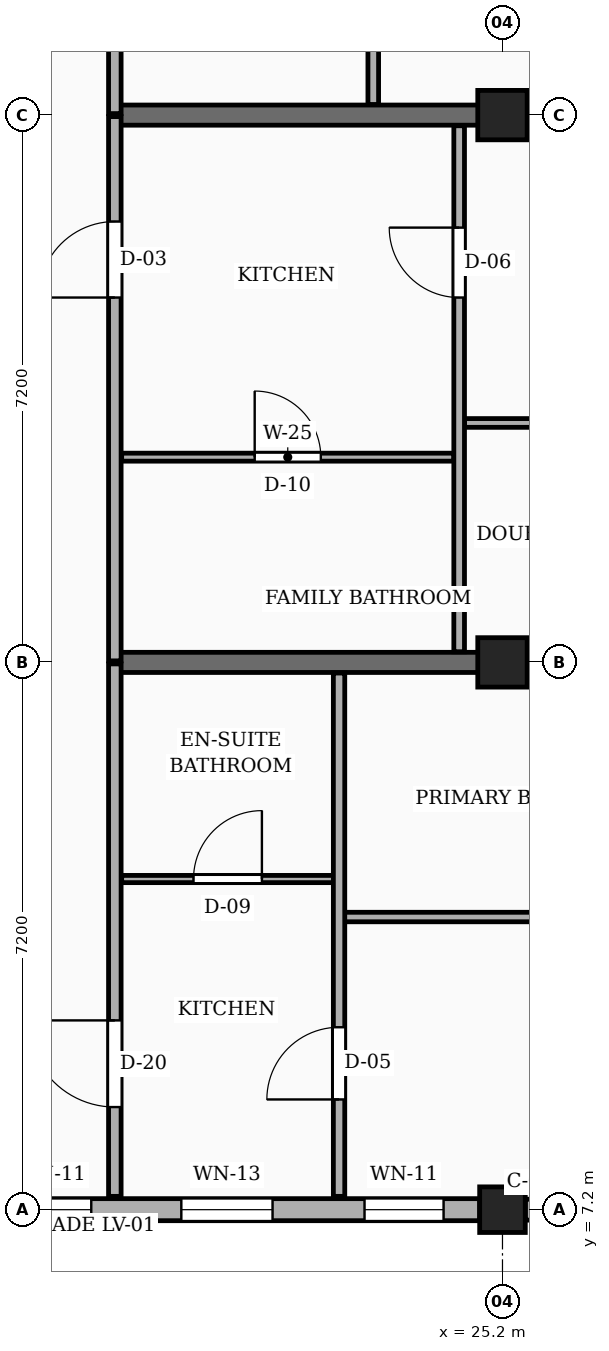
"""IFC4 building model, lengths in metres.
Left out: names, types, materials, properties, quantities, classifications, styles, units other than length and angle.
Written with IfcOpenShell. Run it as: python <this file> out.ifc"""

import sys

from ifc_helpers import new_model, si_unit, direction, frame, frame_2d, origin, origin_2d, place, context, subcontext, project, spatial, rectangle, extrude, element, fill, save


model = new_model("IFC4")
c1 = context("Model", 3, precision=1e-05, world=origin(), true_north=direction((0.0, 1.0)))
c2 = subcontext(c1, "Body", "Model", "MODEL_VIEW")
j1 = project(units=[si_unit("LENGTHUNIT", "METRE"), si_unit("PLANEANGLEUNIT", "RADIAN")], contexts=[c1])
p1 = place(None, origin())
s1 = spatial("IfcSite", under=j1, at=p1, CompositionType="ELEMENT")
p2 = place(p1, origin())
s2 = spatial("IfcBuilding", under=s1, at=p2, CompositionType="ELEMENT")
p3 = place(p2, frame((0.0, 0.0, 4.5)))
s3 = spatial("IfcBuildingStorey", under=s2, at=p3, CompositionType="ELEMENT", Elevation=4.5)
p4 = place(p3, frame((25.2, 7.2, 0.0), z_axis=(0.0, 0.0, 1.0), x_axis=(1.0, 0.0, 0.0)))
e1 = element("IfcColumn", 1, at=p4, inside=s3, PredefinedType="COLUMN", context=c2, shape_type="SweptSolid", body=[
    extrude(rectangle(XDim=0.6, YDim=0.6, at=origin_2d()), origin(), (0.0, 0.0, 1.0), 3.15),
])
for number, where, z_axis, x_axis in (
    (2, (25.2, 14.4, 0.0), (0.0, 0.0, 1.0), (1.0, 0.0, 0.0)),
    (3, (25.2, 21.6, 0.0), (0.0, 0.0, 1.0), (1.0, 0.0, 0.0)),
):
    element("IfcColumn", number, at=place(p3, frame(where, z_axis=z_axis, x_axis=x_axis)), inside=s3, PredefinedType="COLUMN", context=c2, shape_type="SweptSolid", body=[
        extrude(rectangle(XDim=0.65, YDim=0.65, at=origin_2d()), origin(), (0.0, 0.0, 1.0), 3.15),
    ])
for number, where, z_axis, x_axis in (
    (4, (20.1, 14.4, 0.0), (0.0, 0.0, 1.0), (1.0, 0.0, 0.0)),
    (5, (20.1, 21.6, 0.0), (0.0, 0.0, 1.0), (1.0, 0.0, 0.0)),
):
    element("IfcWall", number, at=place(p3, frame(where, z_axis=z_axis, x_axis=x_axis)), inside=s3, PredefinedType="SOLIDWALL", context=c2, shape_type="SweptSolid", body=[
        extrude(rectangle(XDim=12.0, YDim=0.265, at=frame_2d((6.0, 0.0))), origin(), (0.0, 0.0, 1.0), 2.17),
    ])
p5 = place(p3, frame((18.3, 7.2, 0.0), z_axis=(0.0, 0.0, 1.0), x_axis=(1.0, 0.0, 0.0)))
e6 = element("IfcWall", 6, at=p5, inside=s3, PredefinedType="SOLIDWALL", context=c2, shape_type="SweptSolid", body=[
    extrude(rectangle(XDim=6.6, YDim=0.29, at=frame_2d((3.3, 0.0))), origin(), (0.0, 0.0, 1.0), 2.44),
])
p6 = place(p5, frame((0.45, 0.0, 0.78)))
e7 = element("IfcOpeningElement", 7, at=p6, cuts=e6, PredefinedType="OPENING", context=c2, shape_type="SweptSolid", body=[
    extrude(rectangle(XDim=1.04, YDim=1.26, at=frame_2d((0.52, 0.63))), frame((0.0, 0.155, 0.0), z_axis=(0.0, -1.0, 0.0), x_axis=(1.0, 0.0, 0.0)), (0.0, 0.0, 1.0), 0.31),
])
p7 = place(p5, frame((2.675, 0.0, 0.78)))
e8 = element("IfcOpeningElement", 8, at=p7, cuts=e6, PredefinedType="OPENING", context=c2, shape_type="SweptSolid", body=[
    extrude(rectangle(XDim=1.2, YDim=1.26, at=frame_2d((0.6, 0.63))), frame((0.0, 0.155, 0.0), z_axis=(0.0, -1.0, 0.0), x_axis=(1.0, 0.0, 0.0)), (0.0, 0.0, 1.0), 0.31),
])
p8 = place(p5, frame((5.085, 0.0, 0.78)))
e9 = element("IfcOpeningElement", 9, at=p8, cuts=e6, PredefinedType="OPENING", context=c2, shape_type="SweptSolid", body=[
    extrude(rectangle(XDim=1.04, YDim=1.26, at=frame_2d((0.52, 0.63))), frame((0.0, 0.155, 0.0), z_axis=(0.0, -1.0, 0.0), x_axis=(1.0, 0.0, 0.0)), (0.0, 0.0, 1.0), 0.31),
])
p9 = place(p3, frame((25.5, 7.2, 0.0), z_axis=(0.0, 0.0, 1.0), x_axis=(1.0, 0.0, 0.0)))
e10 = element("IfcWall", 10, at=p9, inside=s3, PredefinedType="SOLIDWALL", context=c2, shape_type="SweptSolid", body=[
    extrude(rectangle(XDim=6.6, YDim=0.275, at=frame_2d((3.3, 0.0))), origin(), (0.0, 0.0, 1.0), 2.44),
])
p10 = place(p9, frame((0.45, 0.0, 0.78)))
e11 = element("IfcOpeningElement", 11, at=p10, cuts=e10, PredefinedType="OPENING", context=c2, shape_type="SweptSolid", body=[
    extrude(rectangle(XDim=1.28, YDim=1.26, at=frame_2d((0.64, 0.63))), frame((0.0, 0.147, 0.0), z_axis=(0.0, -1.0, 0.0), x_axis=(1.0, 0.0, 0.0)), (0.0, 0.0, 1.0), 0.295),
])
p11 = place(p9, frame((4.65, 0.0, 0.78)))
e12 = element("IfcOpeningElement", 12, at=p11, cuts=e10, PredefinedType="OPENING", context=c2, shape_type="SweptSolid", body=[
    extrude(rectangle(XDim=1.44, YDim=1.26, at=frame_2d((0.72, 0.63))), frame((0.0, 0.147, 0.0), z_axis=(0.0, -1.0, 0.0), x_axis=(1.0, 0.0, 0.0)), (0.0, 0.0, 1.0), 0.295),
])
p12 = place(p3, frame((20.1, 7.375, 0.0), z_axis=(0.0, 0.0, 1.0), x_axis=(0.0, 1.0, 0.0)))
e13 = element("IfcWall", 13, at=p12, inside=s3, PredefinedType="PARTITIONING", context=c2, shape_type="SweptSolid", body=[
    extrude(rectangle(XDim=7.005, YDim=0.165, at=frame_2d((3.502, 0.0))), origin(), (0.0, 0.0, 1.0), 2.305),
])
p13 = place(p12, frame((1.175, 0.0, 0.0)))
e14 = element("IfcOpeningElement", 14, at=p13, cuts=e13, PredefinedType="OPENING", context=c2, shape_type="SweptSolid", body=[
    extrude(rectangle(XDim=1.14, YDim=2.18, at=frame_2d((0.57, 1.09))), frame((0.0, 0.093, 0.0), z_axis=(0.0, -1.0, 0.0), x_axis=(1.0, 0.0, 0.0)), (0.0, 0.0, 1.0), 0.185),
])
p14 = place(p3, frame((20.1, 14.42, 0.0), z_axis=(0.0, 0.0, 1.0), x_axis=(0.0, 1.0, 0.0)))
e15 = element("IfcWall", 15, at=p14, inside=s3, PredefinedType="PARTITIONING", context=c2, shape_type="SweptSolid", body=[
    extrude(rectangle(XDim=7.16, YDim=0.165, at=frame_2d((3.58, 0.0))), origin(), (0.0, 0.0, 1.0), 2.305),
])
p15 = place(p14, frame((4.78, 0.0, 0.0)))
e16 = element("IfcOpeningElement", 16, at=p15, cuts=e15, PredefinedType="OPENING", context=c2, shape_type="SweptSolid", body=[
    extrude(rectangle(XDim=1.0, YDim=2.15, at=frame_2d((0.5, 1.075))), frame((0.0, 0.093, 0.0), z_axis=(0.0, -1.0, 0.0), x_axis=(1.0, 0.0, 0.0)), (0.0, 0.0, 1.0), 0.185),
])
p16 = place(p3, frame((20.1, 21.62, 0.0), z_axis=(0.0, 0.0, 1.0), x_axis=(0.0, 1.0, 0.0)))
e17 = element("IfcWall", 17, at=p16, inside=s3, PredefinedType="PARTITIONING", context=c2, shape_type="SweptSolid", body=[
    extrude(rectangle(XDim=7.16, YDim=0.165, at=frame_2d((3.58, 0.0))), origin(), (0.0, 0.0, 1.0), 2.305),
])
p17 = place(p16, frame((1.33, 0.0, 0.0)))
e18 = element("IfcOpeningElement", 18, at=p17, cuts=e17, PredefinedType="OPENING", context=c2, shape_type="SweptSolid", body=[
    extrude(rectangle(XDim=0.94, YDim=2.12, at=frame_2d((0.47, 1.06))), frame((0.0, 0.093, 0.0), z_axis=(0.0, -1.0, 0.0), x_axis=(1.0, 0.0, 0.0)), (0.0, 0.0, 1.0), 0.185),
])
p18 = place(p3, frame((23.12, 11.05, 0.0), z_axis=(0.0, 0.0, 1.0), x_axis=(1.0, 0.0, 0.0)))
e19 = element("IfcWall", 19, at=p18, inside=s3, PredefinedType="PARTITIONING", context=c2, shape_type="SweptSolid", body=[
    extrude(rectangle(XDim=9.105, YDim=0.125, at=frame_2d((4.552, 0.0))), origin(), (0.0, 0.0, 1.0), 2.305),
])
p19 = place(p18, frame((4.103, 0.0, 0.0)))
e20 = element("IfcOpeningElement", 20, at=p19, cuts=e19, PredefinedType="OPENING", context=c2, shape_type="SweptSolid", body=[
    extrude(rectangle(XDim=0.9, YDim=2.1, at=frame_2d((0.45, 1.05))), frame((0.0, 0.073, 0.0), z_axis=(0.0, -1.0, 0.0), x_axis=(1.0, 0.0, 0.0)), (0.0, 0.0, 1.0), 0.145),
])
p20 = place(p3, frame((20.19, 11.55, 0.0), z_axis=(0.0, 0.0, 1.0), x_axis=(1.0, 0.0, 0.0)))
e21 = element("IfcWall", 21, at=p20, inside=s3, PredefinedType="PARTITIONING", context=c2, shape_type="SweptSolid", body=[
    extrude(rectangle(XDim=2.79, YDim=0.095, at=frame_2d((1.395, 0.0))), origin(), (0.0, 0.0, 1.0), 2.305),
])
p21 = place(p20, frame((0.945, 0.0, 0.0)))
e22 = element("IfcOpeningElement", 22, at=p21, cuts=e21, PredefinedType="OPENING", context=c2, shape_type="SweptSolid", body=[
    extrude(rectangle(XDim=0.9, YDim=2.05, at=frame_2d((0.45, 1.025))), frame((0.0, 0.058, 0.0), z_axis=(0.0, -1.0, 0.0), x_axis=(1.0, 0.0, 0.0)), (0.0, 0.0, 1.0), 0.115),
])
p22 = place(p3, frame((23.05, 7.375, 0.0), z_axis=(0.0, 0.0, 1.0), x_axis=(0.0, 1.0, 0.0)))
e23 = element("IfcWall", 23, at=p22, inside=s3, PredefinedType="PARTITIONING", context=c2, shape_type="SweptSolid", body=[
    extrude(rectangle(XDim=6.885, YDim=0.15, at=frame_2d((3.442, 0.0))), origin(), (0.0, 0.0, 1.0), 2.305),
])
p23 = place(p22, frame((1.275, 0.0, 0.0)))
e24 = element("IfcOpeningElement", 24, at=p23, cuts=e23, PredefinedType="OPENING", context=c2, shape_type="SweptSolid", body=[
    extrude(rectangle(XDim=0.95, YDim=2.1, at=frame_2d((0.475, 1.05))), frame((0.0, 0.085, 0.0), z_axis=(0.0, -1.0, 0.0), x_axis=(1.0, 0.0, 0.0)), (0.0, 0.0, 1.0), 0.17),
])
p24 = place(p3, frame((24.7, 17.55, 0.0), z_axis=(0.0, 0.0, 1.0), x_axis=(1.0, 0.0, 0.0)))
e25 = element("IfcWall", 25, at=p24, inside=s3, PredefinedType="PARTITIONING", context=c2, shape_type="SweptSolid", body=[
    extrude(rectangle(XDim=7.525, YDim=0.115, at=frame_2d((3.763, 0.0))), origin(), (0.0, 0.0, 1.0), 2.305),
])
p25 = place(p24, frame((3.323, 0.0, 0.0)))
e26 = element("IfcOpeningElement", 26, at=p25, cuts=e25, PredefinedType="OPENING", context=c2, shape_type="SweptSolid", body=[
    extrude(rectangle(XDim=0.88, YDim=2.08, at=frame_2d((0.44, 1.04))), frame((0.0, 0.067, 0.0), z_axis=(0.0, -1.0, 0.0), x_axis=(1.0, 0.0, 0.0)), (0.0, 0.0, 1.0), 0.135),
])
p26 = place(p3, frame((20.19, 17.1, 0.0), z_axis=(0.0, 0.0, 1.0), x_axis=(1.0, 0.0, 0.0)))
e27 = element("IfcWall", 27, at=p26, inside=s3, PredefinedType="PARTITIONING", context=c2, shape_type="SweptSolid", body=[
    extrude(rectangle(XDim=4.37, YDim=0.105, at=frame_2d((2.185, 0.0))), origin(), (0.0, 0.0, 1.0), 2.305),
])
p27 = place(p26, frame((1.75, 0.0, 0.0)))
e28 = element("IfcOpeningElement", 28, at=p27, cuts=e27, PredefinedType="OPENING", context=c2, shape_type="SweptSolid", body=[
    extrude(rectangle(XDim=0.87, YDim=2.05, at=frame_2d((0.435, 1.025))), frame((0.0, 0.062, 0.0), z_axis=(0.0, -1.0, 0.0), x_axis=(1.0, 0.0, 0.0)), (0.0, 0.0, 1.0), 0.125),
])
p28 = place(p3, frame((24.63, 14.54, 0.0), z_axis=(0.0, 0.0, 1.0), x_axis=(0.0, 1.0, 0.0)))
e29 = element("IfcWall", 29, at=p28, inside=s3, PredefinedType="PARTITIONING", context=c2, shape_type="SweptSolid", body=[
    extrude(rectangle(XDim=6.92, YDim=0.14, at=frame_2d((3.46, 0.0))), origin(), (0.0, 0.0, 1.0), 2.305),
])
p29 = place(p28, frame((4.66, 0.0, 0.0)))
e30 = element("IfcOpeningElement", 30, at=p29, cuts=e29, PredefinedType="OPENING", context=c2, shape_type="SweptSolid", body=[
    extrude(rectangle(XDim=0.92, YDim=2.1, at=frame_2d((0.46, 1.05))), frame((0.0, 0.08, 0.0), z_axis=(0.0, -1.0, 0.0), x_axis=(1.0, 0.0, 0.0)), (0.0, 0.0, 1.0), 0.16),
])
p30 = place(p3, frame((23.5, 21.74, 0.0), z_axis=(0.0, 0.0, 1.0), x_axis=(0.0, 1.0, 0.0)))
e31 = element("IfcWall", 31, at=p30, inside=s3, PredefinedType="PARTITIONING", context=c2, shape_type="SweptSolid", body=[
    extrude(rectangle(XDim=6.92, YDim=0.14, at=frame_2d((3.46, 0.0))), origin(), (0.0, 0.0, 1.0), 2.305),
])
p31 = place(p30, frame((1.31, 0.0, 0.0)))
e32 = element("IfcOpeningElement", 32, at=p31, cuts=e31, PredefinedType="OPENING", context=c2, shape_type="SweptSolid", body=[
    extrude(rectangle(XDim=0.95, YDim=2.1, at=frame_2d((0.475, 1.05))), frame((0.0, 0.08, 0.0), z_axis=(0.0, -1.0, 0.0), x_axis=(1.0, 0.0, 0.0)), (0.0, 0.0, 1.0), 0.16),
])
p32 = place(p6, origin())
e33 = element("IfcWindow", 33, at=p32, inside=s3, PartitioningType="SINGLE_PANEL", PredefinedType="WINDOW", context=c2, shape_type="SweptSolid", body=[
    extrude(rectangle(XDim=1.04, YDim=1.26, at=frame_2d((0.52, 0.63))), frame((0.0, 0.03, 0.0), z_axis=(0.0, -1.0, 0.0), x_axis=(1.0, 0.0, 0.0)), (0.0, 0.0, 1.0), 0.06),
])
fill(e7, e33)
p33 = place(p7, origin())
e34 = element("IfcWindow", 34, at=p33, inside=s3, PartitioningType="SINGLE_PANEL", PredefinedType="WINDOW", context=c2, shape_type="SweptSolid", body=[
    extrude(rectangle(XDim=1.2, YDim=1.26, at=frame_2d((0.6, 0.63))), frame((0.0, 0.03, 0.0), z_axis=(0.0, -1.0, 0.0), x_axis=(1.0, 0.0, 0.0)), (0.0, 0.0, 1.0), 0.06),
])
fill(e8, e34)
p34 = place(p8, origin())
e35 = element("IfcWindow", 35, at=p34, inside=s3, PartitioningType="SINGLE_PANEL", PredefinedType="WINDOW", context=c2, shape_type="SweptSolid", body=[
    extrude(rectangle(XDim=1.04, YDim=1.26, at=frame_2d((0.52, 0.63))), frame((0.0, 0.03, 0.0), z_axis=(0.0, -1.0, 0.0), x_axis=(1.0, 0.0, 0.0)), (0.0, 0.0, 1.0), 0.06),
])
fill(e9, e35)
p35 = place(p13, origin())
e36 = element("IfcDoor", 36, at=p35, inside=s3, OperationType="SINGLE_SWING_RIGHT", PredefinedType="DOOR", context=c2, shape_type="SweptSolid", body=[
    extrude(rectangle(XDim=1.14, YDim=2.18, at=frame_2d((0.57, 1.09))), frame((0.0, 0.025, 0.0), z_axis=(0.0, -1.0, 0.0), x_axis=(1.0, 0.0, 0.0)), (0.0, 0.0, 1.0), 0.05),
])
fill(e14, e36)
p36 = place(p15, origin())
e37 = element("IfcDoor", 37, at=p36, inside=s3, OperationType="SINGLE_SWING_LEFT", PredefinedType="DOOR", context=c2, shape_type="SweptSolid", body=[
    extrude(rectangle(XDim=1.0, YDim=2.15, at=frame_2d((0.5, 1.075))), frame((0.0, 0.025, 0.0), z_axis=(0.0, -1.0, 0.0), x_axis=(1.0, 0.0, 0.0)), (0.0, 0.0, 1.0), 0.05),
])
fill(e16, e37)
p37 = place(p21, origin())
e38 = element("IfcDoor", 38, at=p37, inside=s3, OperationType="SINGLE_SWING_RIGHT", PredefinedType="DOOR", context=c2, shape_type="SweptSolid", body=[
    extrude(rectangle(XDim=0.9, YDim=2.05, at=frame_2d((0.45, 1.025))), frame((0.0, 0.025, 0.0), z_axis=(0.0, -1.0, 0.0), x_axis=(1.0, 0.0, 0.0)), (0.0, 0.0, 1.0), 0.05),
])
fill(e22, e38)
p38 = place(p23, origin())
e39 = element("IfcDoor", 39, at=p38, inside=s3, OperationType="SINGLE_SWING_LEFT", PredefinedType="DOOR", context=c2, shape_type="SweptSolid", body=[
    extrude(rectangle(XDim=0.95, YDim=2.1, at=frame_2d((0.475, 1.05))), frame((0.0, 0.025, 0.0), z_axis=(0.0, -1.0, 0.0), x_axis=(1.0, 0.0, 0.0)), (0.0, 0.0, 1.0), 0.05),
])
fill(e24, e39)
p39 = place(p27, origin())
e40 = element("IfcDoor", 40, at=p39, inside=s3, OperationType="SINGLE_SWING_LEFT", PredefinedType="DOOR", context=c2, shape_type="SweptSolid", body=[
    extrude(rectangle(XDim=0.87, YDim=2.05, at=frame_2d((0.435, 1.025))), frame((0.0, 0.025, 0.0), z_axis=(0.0, -1.0, 0.0), x_axis=(1.0, 0.0, 0.0)), (0.0, 0.0, 1.0), 0.05),
])
fill(e28, e40)
p40 = place(p29, origin())
e41 = element("IfcDoor", 41, at=p40, inside=s3, OperationType="SINGLE_SWING_RIGHT", PredefinedType="DOOR", context=c2, shape_type="SweptSolid", body=[
    extrude(rectangle(XDim=0.92, YDim=2.1, at=frame_2d((0.46, 1.05))), frame((0.0, 0.025, 0.0), z_axis=(0.0, -1.0, 0.0), x_axis=(1.0, 0.0, 0.0)), (0.0, 0.0, 1.0), 0.05),
])
fill(e30, e41)
save(model, sys.argv[1])
